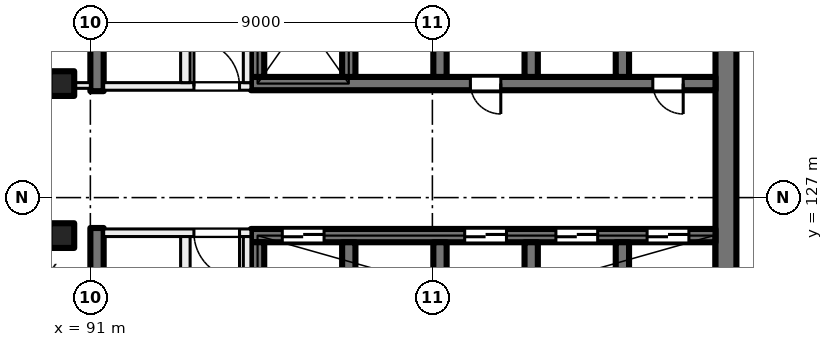
"""IFC4 building model, lengths in metres.
Left out: names, types, materials, properties, quantities, classifications, styles, units other than length and angle.
Written with IfcOpenShell. Run it as: python <this file> out.ifc"""

import sys

from ifc_helpers import new_model, si_unit, direction, frame, frame_2d, origin, origin_2d, place, context, subcontext, project, spatial, rectangle, extrude, element, fill, save


model = new_model("IFC4")
c1 = context("Model", 3, precision=1e-05, world=origin(), true_north=direction((0.0, 1.0)))
c2 = subcontext(c1, "Body", "Model", "MODEL_VIEW")
j1 = project(units=[si_unit("LENGTHUNIT", "METRE"), si_unit("PLANEANGLEUNIT", "RADIAN")], contexts=[c1])
p1 = place(None, origin())
s1 = spatial("IfcSite", under=j1, at=p1, CompositionType="ELEMENT")
p2 = place(p1, origin())
s2 = spatial("IfcBuilding", under=s1, at=p2, CompositionType="ELEMENT")
p3 = place(p2, frame((0.0, 0.0, 166.5)))
s3 = spatial("IfcBuildingStorey", under=s2, at=p3, CompositionType="ELEMENT", Elevation=166.5)
for number, where, z_axis, x_axis in (
    (1, (90.25, 130.0, 0.0), (0.0, 0.0, 1.0), (1.0, 0.0, 0.0)),
    (2, (90.25, 126.0, 0.0), (0.0, 0.0, 1.0), (1.0, 0.0, 0.0)),
):
    element("IfcColumn", number, at=place(p3, frame(where, z_axis=z_axis, x_axis=x_axis)), inside=s3, PredefinedType="COLUMN", context=c2, shape_type="SweptSolid", body=[
        extrude(rectangle(XDim=0.65, YDim=0.65, at=origin_2d()), origin(), (0.0, 0.0, 1.0), 4.0),
    ])
p4 = place(p3, frame((107.725, 135.2, 0.0), z_axis=(0.0, 0.0, 1.0), x_axis=(0.0, -1.0, 0.0)))
e3 = element("IfcWall", 3, at=p4, inside=s3, PredefinedType="SHEAR", context=c2, shape_type="SweptSolid", body=[
    extrude(rectangle(XDim=14.4, YDim=0.55, at=frame_2d((7.2, 0.0))), origin(), (0.0, 0.0, 1.0), 4.0),
])
p5 = place(p3, frame((107.45, 130.0, 0.0), z_axis=(0.0, 0.0, 1.0), x_axis=(-1.0, 0.0, 0.0)))
e4 = element("IfcWall", 4, at=p5, inside=s3, PredefinedType="SHEAR", context=c2, shape_type="SweptSolid", body=[
    extrude(rectangle(XDim=12.225, YDim=0.35, at=frame_2d((6.112, 0.0))), origin(), (0.0, 0.0, 1.0), 4.0),
])
p6 = place(p5, frame((0.85, 0.0, 0.0)))
e5 = element("IfcOpeningElement", 5, at=p6, cuts=e4, PredefinedType="OPENING", context=c2, shape_type="SweptSolid", body=[
    extrude(rectangle(XDim=0.8, YDim=2.1, at=frame_2d((0.4, 1.05))), frame((0.0, 0.185, 0.0), z_axis=(0.0, -1.0, 0.0), x_axis=(1.0, 0.0, 0.0)), (0.0, 0.0, 1.0), 0.37),
])
p7 = place(p5, frame((5.65, 0.0, 0.0)))
e6 = element("IfcOpeningElement", 6, at=p7, cuts=e4, PredefinedType="OPENING", context=c2, shape_type="SweptSolid", body=[
    extrude(rectangle(XDim=0.8, YDim=2.1, at=frame_2d((0.4, 1.05))), frame((0.0, 0.185, 0.0), z_axis=(0.0, -1.0, 0.0), x_axis=(1.0, 0.0, 0.0)), (0.0, 0.0, 1.0), 0.37),
])
for number, where, z_axis, x_axis in (
    (7, (105.0, 133.225, 0.0), (0.0, 0.0, 1.0), (0.0, -1.0, 0.0)),
    (8, (102.6, 133.225, 0.0), (0.0, 0.0, 1.0), (0.0, -1.0, 0.0)),
    (9, (100.2, 133.225, 0.0), (0.0, 0.0, 1.0), (0.0, -1.0, 0.0)),
    (10, (97.8, 133.225, 0.0), (0.0, 0.0, 1.0), (0.0, -1.0, 0.0)),
    (11, (95.4, 133.225, 0.0), (0.0, 0.0, 1.0), (0.0, -1.0, 0.0)),
):
    element("IfcWall", number, at=place(p3, frame(where, z_axis=z_axis, x_axis=x_axis)), inside=s3, PredefinedType="SHEAR", context=c2, shape_type="SweptSolid", body=[
        extrude(rectangle(XDim=3.05, YDim=0.35, at=frame_2d((1.525, 0.0))), origin(), (0.0, 0.0, 1.0), 4.0),
    ])
p8 = place(p3, frame((107.45, 126.0, 0.0), z_axis=(0.0, 0.0, 1.0), x_axis=(-1.0, 0.0, 0.0)))
e12 = element("IfcWall", 12, at=p8, inside=s3, PredefinedType="SHEAR", context=c2, shape_type="SweptSolid", body=[
    extrude(rectangle(XDim=12.225, YDim=0.35, at=frame_2d((6.112, 0.0))), origin(), (0.0, 0.0, 1.0), 4.0),
])
p9 = place(p8, frame((0.7, 0.0, 0.0)))
e13 = element("IfcOpeningElement", 13, at=p9, cuts=e12, PredefinedType="OPENING", context=c2, shape_type="SweptSolid", body=[
    extrude(rectangle(XDim=1.1, YDim=2.1, at=frame_2d((0.55, 1.05))), frame((0.0, 0.185, 0.0), z_axis=(0.0, -1.0, 0.0), x_axis=(1.0, 0.0, 0.0)), (0.0, 0.0, 1.0), 0.37),
])
p10 = place(p8, frame((3.1, 0.0, 0.0)))
e14 = element("IfcOpeningElement", 14, at=p10, cuts=e12, PredefinedType="OPENING", context=c2, shape_type="SweptSolid", body=[
    extrude(rectangle(XDim=1.1, YDim=2.1, at=frame_2d((0.55, 1.05))), frame((0.0, 0.185, 0.0), z_axis=(0.0, -1.0, 0.0), x_axis=(1.0, 0.0, 0.0)), (0.0, 0.0, 1.0), 0.37),
])
p11 = place(p8, frame((5.5, 0.0, 0.0)))
e15 = element("IfcOpeningElement", 15, at=p11, cuts=e12, PredefinedType="OPENING", context=c2, shape_type="SweptSolid", body=[
    extrude(rectangle(XDim=1.1, YDim=2.1, at=frame_2d((0.55, 1.05))), frame((0.0, 0.185, 0.0), z_axis=(0.0, -1.0, 0.0), x_axis=(1.0, 0.0, 0.0)), (0.0, 0.0, 1.0), 0.37),
])
p12 = place(p8, frame((10.3, 0.0, 0.0)))
e16 = element("IfcOpeningElement", 16, at=p12, cuts=e12, PredefinedType="OPENING", context=c2, shape_type="SweptSolid", body=[
    extrude(rectangle(XDim=1.1, YDim=2.1, at=frame_2d((0.55, 1.05))), frame((0.0, 0.185, 0.0), z_axis=(0.0, -1.0, 0.0), x_axis=(1.0, 0.0, 0.0)), (0.0, 0.0, 1.0), 0.37),
])
for number, where, z_axis, x_axis in (
    (17, (105.0, 125.825, 0.0), (0.0, 0.0, 1.0), (0.0, -1.0, 0.0)),
    (18, (102.6, 125.825, 0.0), (0.0, 0.0, 1.0), (0.0, -1.0, 0.0)),
    (19, (100.2, 125.825, 0.0), (0.0, 0.0, 1.0), (0.0, -1.0, 0.0)),
    (20, (97.8, 125.825, 0.0), (0.0, 0.0, 1.0), (0.0, -1.0, 0.0)),
    (21, (95.4, 125.825, 0.0), (0.0, 0.0, 1.0), (0.0, -1.0, 0.0)),
):
    element("IfcWall", number, at=place(p3, frame(where, z_axis=z_axis, x_axis=x_axis)), inside=s3, PredefinedType="SHEAR", context=c2, shape_type="SweptSolid", body=[
        extrude(rectangle(XDim=3.05, YDim=0.35, at=frame_2d((1.525, 0.0))), origin(), (0.0, 0.0, 1.0), 4.0),
    ])
for number, where, z_axis, x_axis in (
    (22, (91.175, 138.45, 0.0), (0.0, 0.0, 1.0), (0.0, -1.0, 0.0)),
    (23, (91.175, 126.2, 0.0), (0.0, 0.0, 1.0), (0.0, -1.0, 0.0)),
):
    element("IfcWall", number, at=place(p3, frame(where, z_axis=z_axis, x_axis=x_axis)), inside=s3, PredefinedType="SHEAR", context=c2, shape_type="SweptSolid", body=[
        extrude(rectangle(XDim=8.65, YDim=0.35, at=frame_2d((4.325, 0.0))), origin(), (0.0, 0.0, 1.0), 4.0),
    ])
p13 = place(p3, frame((95.225, 126.075, 0.0), z_axis=(0.0, 0.0, 1.0), x_axis=(-1.0, 0.0, 0.0)))
e24 = element("IfcWall", 24, at=p13, inside=s3, PredefinedType="PARTITIONING", context=c2, shape_type="SweptSolid", body=[
    extrude(rectangle(XDim=3.875, YDim=0.2, at=frame_2d((1.938, 0.0))), origin(), (0.0, 0.0, 1.0), 3.625),
])
p14 = place(p13, frame((0.3, 0.0, 0.0)))
e25 = element("IfcOpeningElement", 25, at=p14, cuts=e24, PredefinedType="OPENING", context=c2, shape_type="SweptSolid", body=[
    extrude(rectangle(XDim=1.2, YDim=2.1, at=frame_2d((0.6, 1.05))), frame((0.0, 0.11, 0.0), z_axis=(0.0, -1.0, 0.0), x_axis=(1.0, 0.0, 0.0)), (0.0, 0.0, 1.0), 0.22),
])
p15 = place(p3, frame((95.125, 117.55, 0.0), z_axis=(0.0, 0.0, 1.0), x_axis=(0.0, 1.0, 0.0)))
e26 = element("IfcWall", 26, at=p15, inside=s3, PredefinedType="PARTITIONING", context=c2, shape_type="SweptSolid", body=[
    extrude(rectangle(XDim=8.425, YDim=0.2, at=frame_2d((4.212, 0.0))), origin(), (0.0, 0.0, 1.0), 3.625),
])
p16 = place(p15, frame((1.688, 0.0, 0.0)))
e27 = element("IfcOpeningElement", 27, at=p16, cuts=e26, PredefinedType="OPENING", context=c2, shape_type="SweptSolid", body=[
    extrude(rectangle(XDim=1.5, YDim=2.1, at=frame_2d((0.75, 1.05))), frame((0.0, 0.11, 0.0), z_axis=(0.0, -1.0, 0.0), x_axis=(1.0, 0.0, 0.0)), (0.0, 0.0, 1.0), 0.22),
])
p17 = place(p3, frame((93.5, 117.55, 0.0), z_axis=(0.0, 0.0, 1.0), x_axis=(0.0, 1.0, 0.0)))
e28 = element("IfcWall", 28, at=p17, inside=s3, PredefinedType="PARTITIONING", context=c2, shape_type="SweptSolid", body=[
    extrude(rectangle(XDim=8.425, YDim=0.25, at=frame_2d((4.212, 0.0))), origin(), (0.0, 0.0, 1.0), 3.625),
])
p18 = place(p17, frame((5.942, 0.0, 0.0)))
e29 = element("IfcOpeningElement", 29, at=p18, cuts=e28, PredefinedType="OPENING", context=c2, shape_type="SweptSolid", body=[
    extrude(rectangle(XDim=0.8, YDim=2.1, at=frame_2d((0.4, 1.05))), frame((0.0, 0.135, 0.0), z_axis=(0.0, -1.0, 0.0), x_axis=(1.0, 0.0, 0.0)), (0.0, 0.0, 1.0), 0.27),
])
p19 = place(p17, frame((1.68, 0.0, 0.0)))
e30 = element("IfcOpeningElement", 30, at=p19, cuts=e28, PredefinedType="OPENING", context=c2, shape_type="SweptSolid", body=[
    extrude(rectangle(XDim=0.8, YDim=2.1, at=frame_2d((0.4, 1.05))), frame((0.0, 0.135, 0.0), z_axis=(0.0, -1.0, 0.0), x_axis=(1.0, 0.0, 0.0)), (0.0, 0.0, 1.0), 0.27),
])
p20 = place(p3, frame((91.35, 129.925, 0.0), z_axis=(0.0, 0.0, 1.0), x_axis=(1.0, 0.0, 0.0)))
e31 = element("IfcWall", 31, at=p20, inside=s3, PredefinedType="PARTITIONING", context=c2, shape_type="SweptSolid", body=[
    extrude(rectangle(XDim=3.875, YDim=0.2, at=frame_2d((1.938, 0.0))), origin(), (0.0, 0.0, 1.0), 3.625),
])
p21 = place(p20, frame((2.375, 0.0, 0.0)))
e32 = element("IfcOpeningElement", 32, at=p21, cuts=e31, PredefinedType="OPENING", context=c2, shape_type="SweptSolid", body=[
    extrude(rectangle(XDim=1.2, YDim=2.1, at=frame_2d((0.6, 1.05))), frame((0.0, 0.11, 0.0), z_axis=(0.0, -1.0, 0.0), x_axis=(1.0, 0.0, 0.0)), (0.0, 0.0, 1.0), 0.22),
])
p22 = place(p3, frame((95.125, 130.025, 0.0), z_axis=(0.0, 0.0, 1.0), x_axis=(0.0, 1.0, 0.0)))
e33 = element("IfcWall", 33, at=p22, inside=s3, PredefinedType="PARTITIONING", context=c2, shape_type="SweptSolid", body=[
    extrude(rectangle(XDim=8.425, YDim=0.2, at=frame_2d((4.212, 0.0))), origin(), (0.0, 0.0, 1.0), 3.625),
])
p23 = place(p22, frame((5.238, 0.0, 0.0)))
e34 = element("IfcOpeningElement", 34, at=p23, cuts=e33, PredefinedType="OPENING", context=c2, shape_type="SweptSolid", body=[
    extrude(rectangle(XDim=1.5, YDim=2.1, at=frame_2d((0.75, 1.05))), frame((0.0, 0.11, 0.0), z_axis=(0.0, -1.0, 0.0), x_axis=(1.0, 0.0, 0.0)), (0.0, 0.0, 1.0), 0.22),
])
p24 = place(p3, frame((93.5, 130.025, 0.0), z_axis=(0.0, 0.0, 1.0), x_axis=(0.0, 1.0, 0.0)))
e35 = element("IfcWall", 35, at=p24, inside=s3, PredefinedType="PARTITIONING", context=c2, shape_type="SweptSolid", body=[
    extrude(rectangle(XDim=8.425, YDim=0.25, at=frame_2d((4.212, 0.0))), origin(), (0.0, 0.0, 1.0), 3.625),
])
p25 = place(p24, frame((3.812, 0.0, 0.0)))
e36 = element("IfcOpeningElement", 36, at=p25, cuts=e35, PredefinedType="OPENING", context=c2, shape_type="SweptSolid", body=[
    extrude(rectangle(XDim=0.8, YDim=2.1, at=frame_2d((0.4, 1.05))), frame((0.0, 0.135, 0.0), z_axis=(0.0, -1.0, 0.0), x_axis=(1.0, 0.0, 0.0)), (0.0, 0.0, 1.0), 0.27),
])
p26 = place(p3, frame((85.825, 129.95, 0.0), z_axis=(0.0, 0.0, 1.0), x_axis=(1.0, 0.0, 0.0)))
e37 = element("IfcWall", 37, at=p26, inside=s3, PredefinedType="PARTITIONING", context=c2, shape_type="SweptSolid", body=[
    extrude(rectangle(XDim=5.175, YDim=0.15, at=frame_2d((2.587, 0.0))), origin(), (0.0, 0.0, 1.0), 3.625),
])
p27 = place(p26, frame((2.077, 0.0, 0.0)))
e38 = element("IfcOpeningElement", 38, at=p27, cuts=e37, PredefinedType="OPENING", context=c2, shape_type="SweptSolid", body=[
    extrude(rectangle(XDim=1.0, YDim=2.1, at=frame_2d((0.5, 1.05))), frame((0.0, 0.085, 0.0), z_axis=(0.0, -1.0, 0.0), x_axis=(1.0, 0.0, 0.0)), (0.0, 0.0, 1.0), 0.17),
])
p28 = place(p9, origin())
e39 = element("IfcDoor", 39, at=p28, inside=s3, OperationType="DOUBLE_DOOR_SLIDING", PredefinedType="DOOR", context=c2, shape_type="SweptSolid", body=[
    extrude(rectangle(XDim=1.1, YDim=2.1, at=frame_2d((0.55, 1.05))), frame((0.0, 0.025, 0.0), z_axis=(0.0, -1.0, 0.0), x_axis=(1.0, 0.0, 0.0)), (0.0, 0.0, 1.0), 0.05),
])
fill(e13, e39)
p29 = place(p10, origin())
e40 = element("IfcDoor", 40, at=p29, inside=s3, OperationType="DOUBLE_DOOR_SLIDING", PredefinedType="DOOR", context=c2, shape_type="SweptSolid", body=[
    extrude(rectangle(XDim=1.1, YDim=2.1, at=frame_2d((0.55, 1.05))), frame((0.0, 0.025, 0.0), z_axis=(0.0, -1.0, 0.0), x_axis=(1.0, 0.0, 0.0)), (0.0, 0.0, 1.0), 0.05),
])
fill(e14, e40)
p30 = place(p11, origin())
e41 = element("IfcDoor", 41, at=p30, inside=s3, OperationType="DOUBLE_DOOR_SLIDING", PredefinedType="DOOR", context=c2, shape_type="SweptSolid", body=[
    extrude(rectangle(XDim=1.1, YDim=2.1, at=frame_2d((0.55, 1.05))), frame((0.0, 0.025, 0.0), z_axis=(0.0, -1.0, 0.0), x_axis=(1.0, 0.0, 0.0)), (0.0, 0.0, 1.0), 0.05),
])
fill(e15, e41)
p31 = place(p12, origin())
e42 = element("IfcDoor", 42, at=p31, inside=s3, OperationType="DOUBLE_DOOR_SLIDING", PredefinedType="DOOR", context=c2, shape_type="SweptSolid", body=[
    extrude(rectangle(XDim=1.1, YDim=2.1, at=frame_2d((0.55, 1.05))), frame((0.0, 0.025, 0.0), z_axis=(0.0, -1.0, 0.0), x_axis=(1.0, 0.0, 0.0)), (0.0, 0.0, 1.0), 0.05),
])
fill(e16, e42)
p32 = place(p6, origin())
e43 = element("IfcDoor", 43, at=p32, inside=s3, OperationType="SINGLE_SWING_LEFT", PredefinedType="DOOR", context=c2, shape_type="SweptSolid", body=[
    extrude(rectangle(XDim=0.8, YDim=2.1, at=frame_2d((0.4, 1.05))), frame((0.0, 0.025, 0.0), z_axis=(0.0, -1.0, 0.0), x_axis=(1.0, 0.0, 0.0)), (0.0, 0.0, 1.0), 0.05),
])
fill(e5, e43)
p33 = place(p7, origin())
e44 = element("IfcDoor", 44, at=p33, inside=s3, OperationType="SINGLE_SWING_RIGHT", PredefinedType="DOOR", context=c2, shape_type="SweptSolid", body=[
    extrude(rectangle(XDim=0.8, YDim=2.1, at=frame_2d((0.4, 1.05))), frame((0.0, 0.025, 0.0), z_axis=(0.0, -1.0, 0.0), x_axis=(1.0, 0.0, 0.0)), (0.0, 0.0, 1.0), 0.05),
])
fill(e6, e44)
p34 = place(p14, origin())
e45 = element("IfcDoor", 45, at=p34, inside=s3, OperationType="DOUBLE_DOOR_SINGLE_SWING", PredefinedType="DOOR", context=c2, shape_type="SweptSolid", body=[
    extrude(rectangle(XDim=1.2, YDim=2.1, at=frame_2d((0.6, 1.05))), frame((0.0, 0.025, 0.0), z_axis=(0.0, -1.0, 0.0), x_axis=(1.0, 0.0, 0.0)), (0.0, 0.0, 1.0), 0.05),
])
fill(e25, e45)
p35 = place(p21, origin())
e46 = element("IfcDoor", 46, at=p35, inside=s3, OperationType="DOUBLE_DOOR_SINGLE_SWING", PredefinedType="DOOR", context=c2, shape_type="SweptSolid", body=[
    extrude(rectangle(XDim=1.2, YDim=2.1, at=frame_2d((0.6, 1.05))), frame((0.0, 0.025, 0.0), z_axis=(0.0, -1.0, 0.0), x_axis=(1.0, 0.0, 0.0)), (0.0, 0.0, 1.0), 0.05),
])
fill(e32, e46)
save(model, sys.argv[1])
